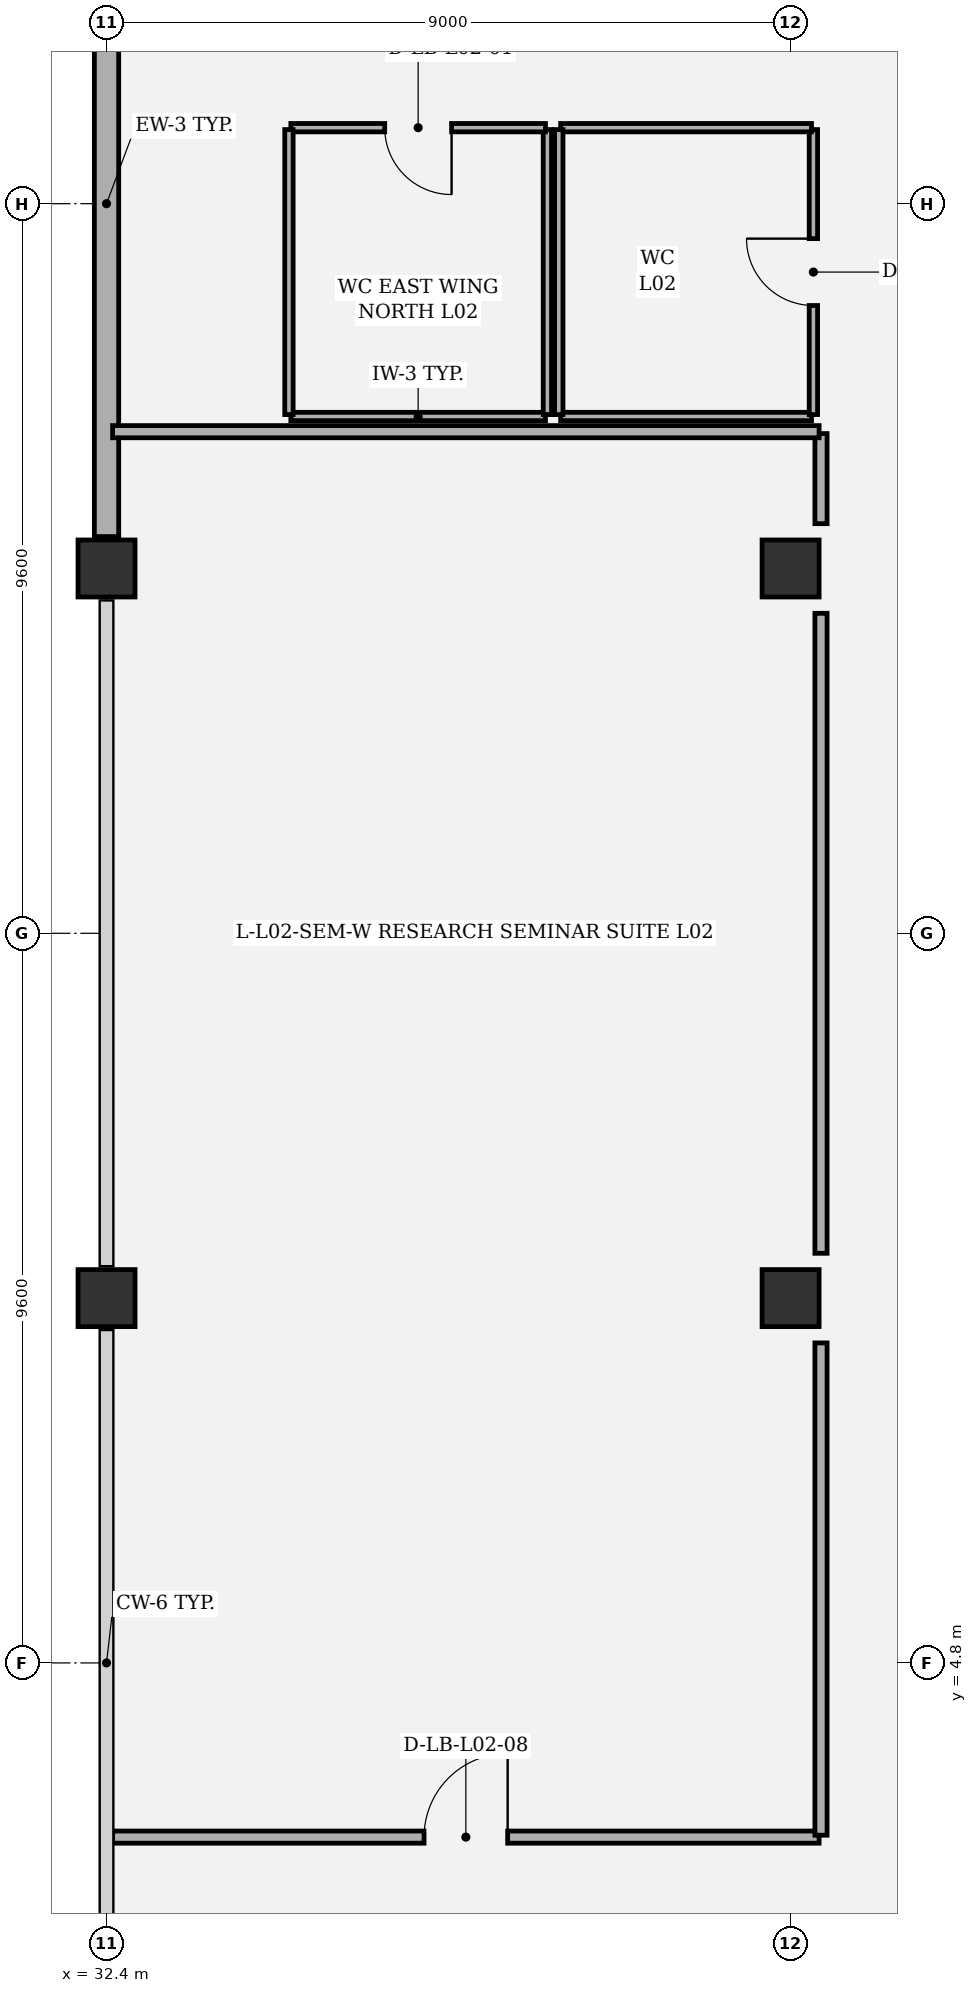
"""IFC4 building model, lengths in metres.
Left out: names, types, materials, properties, quantities, classifications, styles, units other than length and angle.
Written with IfcOpenShell. Run it as: python <this file> out.ifc"""

import sys

from ifc_helpers import new_model, si_unit, direction, frame, frame_2d, origin, origin_2d, place, context, subcontext, project, spatial, rectangle, extrude, element, fill, save


model = new_model("IFC4")
c1 = context("Model", 3, precision=1e-05, world=origin(), true_north=direction((0.0, 1.0)))
c2 = subcontext(c1, "Body", "Model", "MODEL_VIEW")
j1 = project(units=[si_unit("LENGTHUNIT", "METRE"), si_unit("PLANEANGLEUNIT", "RADIAN")], contexts=[c1])
p1 = place(None, origin())
s1 = spatial("IfcSite", under=j1, at=p1, CompositionType="ELEMENT")
p2 = place(p1, origin())
s2 = spatial("IfcBuilding", under=s1, at=p2, CompositionType="ELEMENT")
p3 = place(p2, frame((0.0, 0.0, 12.0)))
s3 = spatial("IfcBuildingStorey", under=s2, at=p3, CompositionType="ELEMENT", Elevation=12.0)
for number, where, z_axis, x_axis in (
    (1, (32.4, 9.6, 0.0), (0.0, 0.0, 1.0), (1.0, 0.0, 0.0)),
    (2, (32.4, 19.2, 0.0), (0.0, 0.0, 1.0), (1.0, 0.0, 0.0)),
    (3, (41.4, 9.6, 0.0), (0.0, 0.0, 1.0), (1.0, 0.0, 0.0)),
    (4, (41.4, 19.2, 0.0), (0.0, 0.0, 1.0), (1.0, 0.0, 0.0)),
):
    element("IfcColumn", number, at=place(p3, frame(where, z_axis=z_axis, x_axis=x_axis)), inside=s3, PredefinedType="COLUMN", context=c2, shape_type="SweptSolid", body=[
        extrude(rectangle(XDim=0.75, YDim=0.75, at=origin_2d()), origin(), (0.0, 0.0, 1.0), 5.0),
    ])
p4 = place(p3, frame((32.4, 19.62, 0.0), z_axis=(0.0, 0.0, 1.0), x_axis=(0.0, 1.0, 0.0)))
e5 = element("IfcWall", 5, at=p4, inside=s3, PredefinedType="SOLIDWALL", context=c2, shape_type="SweptSolid", body=[
    extrude(rectangle(XDim=8.76, YDim=0.32, at=frame_2d((4.38, 0.0))), origin(), (0.0, 0.0, 1.0), 3.937),
])
p5 = place(p3, frame((34.825, 21.2, 0.0), z_axis=(0.0, 0.0, 1.0), x_axis=(1.0, 0.0, 0.0)))
e6 = element("IfcWall", 6, at=p5, inside=s3, PredefinedType="PARTITIONING", context=c2, shape_type="SweptSolid", body=[
    extrude(rectangle(XDim=3.35, YDim=0.11, at=frame_2d((1.675, 0.0))), origin(), (0.0, 0.0, 1.0), 4.74),
])
p6 = place(p3, frame((38.2, 21.225, 0.0), z_axis=(0.0, 0.0, 1.0), x_axis=(0.0, 1.0, 0.0)))
e7 = element("IfcWall", 7, at=p6, inside=s3, PredefinedType="PARTITIONING", context=c2, shape_type="SweptSolid", body=[
    extrude(rectangle(XDim=3.75, YDim=0.11, at=frame_2d((1.875, 0.0))), origin(), (0.0, 0.0, 1.0), 4.74),
])
p7 = place(p3, frame((38.175, 25.0, 0.0), z_axis=(0.0, 0.0, 1.0), x_axis=(-1.0, 0.0, 0.0)))
e8 = element("IfcWall", 8, at=p7, inside=s3, PredefinedType="PARTITIONING", context=c2, shape_type="SweptSolid", body=[
    extrude(rectangle(XDim=3.35, YDim=0.11, at=frame_2d((1.675, 0.0))), origin(), (0.0, 0.0, 1.0), 4.74),
])
p8 = place(p7, frame((1.235, 0.0, 0.0)))
e9 = element("IfcOpeningElement", 9, at=p8, cuts=e8, PredefinedType="OPENING", context=c2, shape_type="SweptSolid", body=[
    extrude(rectangle(XDim=0.88, YDim=2.1, at=frame_2d((0.44, 1.05))), frame((0.0, 0.065, 0.0), z_axis=(0.0, -1.0, 0.0), x_axis=(1.0, 0.0, 0.0)), (0.0, 0.0, 1.0), 0.13),
])
p9 = place(p3, frame((34.8, 24.975, 0.0), z_axis=(0.0, 0.0, 1.0), x_axis=(0.0, -1.0, 0.0)))
e10 = element("IfcWall", 10, at=p9, inside=s3, PredefinedType="PARTITIONING", context=c2, shape_type="SweptSolid", body=[
    extrude(rectangle(XDim=3.75, YDim=0.11, at=frame_2d((1.875, 0.0))), origin(), (0.0, 0.0, 1.0), 4.74),
])
p10 = place(p3, frame((38.375, 21.2, 0.0), z_axis=(0.0, 0.0, 1.0), x_axis=(1.0, 0.0, 0.0)))
e11 = element("IfcWall", 11, at=p10, inside=s3, PredefinedType="PARTITIONING", context=c2, shape_type="SweptSolid", body=[
    extrude(rectangle(XDim=3.3, YDim=0.11, at=frame_2d((1.65, 0.0))), origin(), (0.0, 0.0, 1.0), 4.74),
])
p11 = place(p3, frame((41.7, 21.225, 0.0), z_axis=(0.0, 0.0, 1.0), x_axis=(0.0, 1.0, 0.0)))
e12 = element("IfcWall", 12, at=p11, inside=s3, PredefinedType="PARTITIONING", context=c2, shape_type="SweptSolid", body=[
    extrude(rectangle(XDim=3.75, YDim=0.11, at=frame_2d((1.875, 0.0))), origin(), (0.0, 0.0, 1.0), 4.094),
])
p12 = place(p11, frame((1.435, 0.0, 0.0)))
e13 = element("IfcOpeningElement", 13, at=p12, cuts=e12, PredefinedType="OPENING", context=c2, shape_type="SweptSolid", body=[
    extrude(rectangle(XDim=0.88, YDim=2.1, at=frame_2d((0.44, 1.05))), frame((0.0, 0.065, 0.0), z_axis=(0.0, -1.0, 0.0), x_axis=(1.0, 0.0, 0.0)), (0.0, 0.0, 1.0), 0.13),
])
p13 = place(p3, frame((41.675, 25.0, 0.0), z_axis=(0.0, 0.0, 1.0), x_axis=(-1.0, 0.0, 0.0)))
e14 = element("IfcWall", 14, at=p13, inside=s3, PredefinedType="PARTITIONING", context=c2, shape_type="SweptSolid", body=[
    extrude(rectangle(XDim=3.3, YDim=0.11, at=frame_2d((1.65, 0.0))), origin(), (0.0, 0.0, 1.0), 4.74),
])
p14 = place(p3, frame((38.35, 24.975, 0.0), z_axis=(0.0, 0.0, 1.0), x_axis=(0.0, -1.0, 0.0)))
e15 = element("IfcWall", 15, at=p14, inside=s3, PredefinedType="PARTITIONING", context=c2, shape_type="SweptSolid", body=[
    extrude(rectangle(XDim=3.75, YDim=0.11, at=frame_2d((1.875, 0.0))), origin(), (0.0, 0.0, 1.0), 4.74),
])
p15 = place(p3, frame((32.48, 2.508, 0.0), z_axis=(0.0, 0.0, 1.0), x_axis=(1.0, 0.0, 0.0)))
e16 = element("IfcWall", 16, at=p15, inside=s3, PredefinedType="PARTITIONING", context=c2, shape_type="SweptSolid", body=[
    extrude(rectangle(XDim=9.295, YDim=0.16, at=frame_2d((4.647, 0.0))), origin(), (0.0, 0.0, 1.0), 4.253),
])
p16 = place(p15, frame((4.097, 0.0, 0.0)))
e17 = element("IfcOpeningElement", 17, at=p16, cuts=e16, PredefinedType="OPENING", context=c2, shape_type="SweptSolid", body=[
    extrude(rectangle(XDim=1.1, YDim=2.15, at=frame_2d((0.55, 1.075))), frame((0.0, 0.09, 0.0), z_axis=(0.0, -1.0, 0.0), x_axis=(1.0, 0.0, 0.0)), (0.0, 0.0, 1.0), 0.18),
])
p17 = place(p3, frame((41.8, 2.533, 0.0), z_axis=(0.0, 0.0, 1.0), x_axis=(0.0, 1.0, 0.0)))
e18 = element("IfcWall", 18, at=p17, inside=s3, PredefinedType="PARTITIONING", context=c2, shape_type="SweptSolid", body=[
    extrude(rectangle(XDim=6.477, YDim=0.16, at=frame_2d((3.239, 0.0))), origin(), (0.0, 0.0, 1.0), 4.74),
])
p18 = place(p3, frame((41.8, 10.19, 0.0), z_axis=(0.0, 0.0, 1.0), x_axis=(0.0, 1.0, 0.0)))
e19 = element("IfcWall", 19, at=p18, inside=s3, PredefinedType="PARTITIONING", context=c2, shape_type="SweptSolid", body=[
    extrude(rectangle(XDim=8.421, YDim=0.16, at=frame_2d((4.21, 0.0))), origin(), (0.0, 0.0, 1.0), 4.74),
])
p19 = place(p3, frame((41.8, 19.79, 0.0), z_axis=(0.0, 0.0, 1.0), x_axis=(0.0, 1.0, 0.0)))
e20 = element("IfcWall", 20, at=p19, inside=s3, PredefinedType="PARTITIONING", context=c2, shape_type="SweptSolid", body=[
    extrude(rectangle(XDim=1.186, YDim=0.16, at=frame_2d((0.593, 0.0))), origin(), (0.0, 0.0, 1.0), 4.74),
])
p20 = place(p3, frame((41.775, 21.0, 0.0), z_axis=(0.0, 0.0, 1.0), x_axis=(-1.0, 0.0, 0.0)))
e21 = element("IfcWall", 21, at=p20, inside=s3, PredefinedType="PARTITIONING", context=c2, shape_type="SweptSolid", body=[
    extrude(rectangle(XDim=9.295, YDim=0.16, at=frame_2d((4.647, 0.0))), origin(), (0.0, 0.0, 1.0), 4.74),
])
p21 = place(p8, origin())
e22 = element("IfcDoor", 22, at=p21, inside=s3, OperationType="SINGLE_SWING_LEFT", PredefinedType="DOOR", context=c2, shape_type="SweptSolid", body=[
    extrude(rectangle(XDim=0.88, YDim=2.1, at=frame_2d((0.44, 1.05))), frame((0.0, 0.025, 0.0), z_axis=(0.0, -1.0, 0.0), x_axis=(1.0, 0.0, 0.0)), (0.0, 0.0, 1.0), 0.05),
])
fill(e9, e22)
p22 = place(p12, origin())
e23 = element("IfcDoor", 23, at=p22, inside=s3, OperationType="SINGLE_SWING_RIGHT", PredefinedType="DOOR", context=c2, shape_type="SweptSolid", body=[
    extrude(rectangle(XDim=0.88, YDim=2.1, at=frame_2d((0.44, 1.05))), frame((0.0, 0.025, 0.0), z_axis=(0.0, -1.0, 0.0), x_axis=(1.0, 0.0, 0.0)), (0.0, 0.0, 1.0), 0.05),
])
fill(e13, e23)
p23 = place(p16, origin())
e24 = element("IfcDoor", 24, at=p23, inside=s3, OperationType="SINGLE_SWING_RIGHT", PredefinedType="DOOR", context=c2, shape_type="SweptSolid", body=[
    extrude(rectangle(XDim=1.1, YDim=2.15, at=frame_2d((0.55, 1.075))), frame((0.0, 0.025, 0.0), z_axis=(0.0, -1.0, 0.0), x_axis=(1.0, 0.0, 0.0)), (0.0, 0.0, 1.0), 0.05),
])
fill(e17, e24)
save(model, sys.argv[1])
